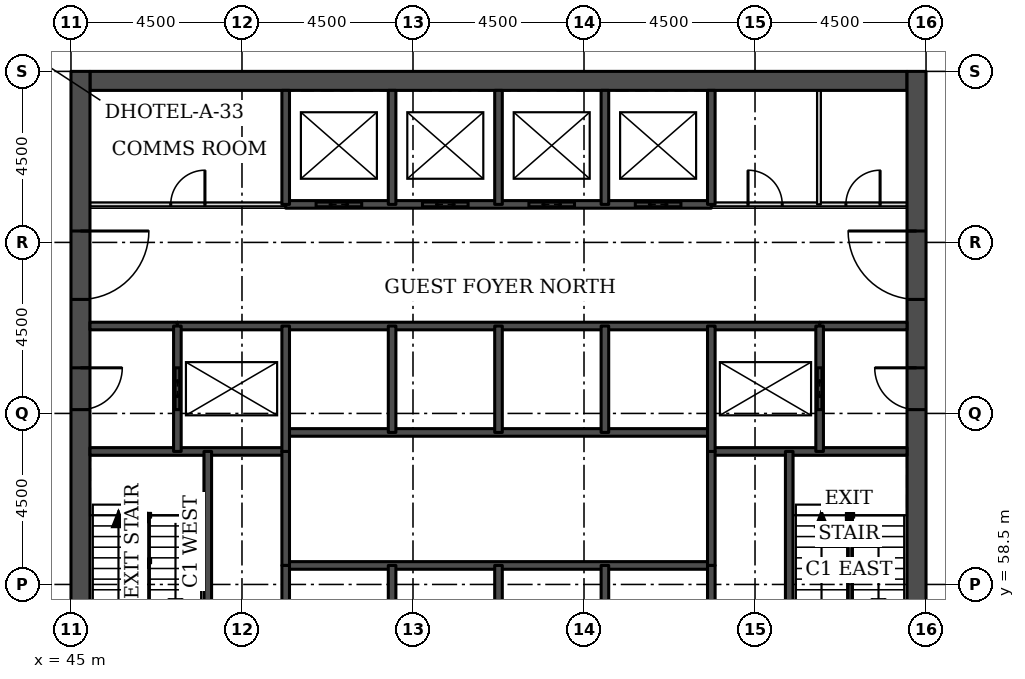
"""IFC4 building model, lengths in metres.
Left out: names, types, materials, properties, quantities, classifications, styles, units other than length and angle.
Written with IfcOpenShell. Run it as: python <this file> out.ifc"""

import sys

from ifc_helpers import new_model, si_unit, direction, frame, frame_2d, origin, place, context, subcontext, project, spatial, rectangle, extrude, element, fill, save


model = new_model("IFC4")
c1 = context("Model", 3, precision=1e-05, world=origin(), true_north=direction((0.0, 1.0)))
c2 = subcontext(c1, "Body", "Model", "MODEL_VIEW")
j1 = project(units=[si_unit("LENGTHUNIT", "METRE"), si_unit("PLANEANGLEUNIT", "RADIAN")], contexts=[c1])
p1 = place(None, origin())
s1 = spatial("IfcSite", under=j1, at=p1, CompositionType="ELEMENT")
p2 = place(p1, origin())
s2 = spatial("IfcBuilding", under=s1, at=p2, CompositionType="ELEMENT")
p3 = place(p2, frame((0.0, 0.0, 26.4)))
s3 = spatial("IfcBuildingStorey", under=s2, at=p3, CompositionType="ELEMENT", Elevation=26.4)
p4 = place(p3, frame((45.5, 71.75, 0.0), z_axis=(0.0, 0.0, 1.0), x_axis=(1.0, 0.0, 0.0)))
e1 = element("IfcWall", 1, at=p4, inside=s3, PredefinedType="SHEAR", context=c2, shape_type="SweptSolid", body=[
    extrude(rectangle(XDim=21.5, YDim=0.5, at=frame_2d((10.75, 0.0))), origin(), (0.0, 0.0, 1.0), 3.3),
])
p5 = place(p3, frame((45.25, 49.5, 0.0), z_axis=(0.0, 0.0, 1.0), x_axis=(0.0, 1.0, 0.0)))
e2 = element("IfcWall", 2, at=p5, inside=s3, PredefinedType="SHEAR", context=c2, shape_type="SweptSolid", body=[
    extrude(rectangle(XDim=22.5, YDim=0.5, at=frame_2d((11.25, 0.0))), origin(), (0.0, 0.0, 1.0), 3.3),
])
p6 = place(p5, frame((4.2, 0.0, 0.0)))
e3 = element("IfcOpeningElement", 3, at=p6, cuts=e2, PredefinedType="OPENING", context=c2, shape_type="SweptSolid", body=[
    extrude(rectangle(XDim=1.8, YDim=2.1, at=frame_2d((0.9, 1.05))), frame((0.0, 0.26, 0.0), z_axis=(0.0, -1.0, 0.0), x_axis=(1.0, 0.0, 0.0)), (0.0, 0.0, 1.0), 0.52),
])
p7 = place(p5, frame((6.9, 0.0, 0.0)))
e4 = element("IfcOpeningElement", 4, at=p7, cuts=e2, PredefinedType="OPENING", context=c2, shape_type="SweptSolid", body=[
    extrude(rectangle(XDim=1.1, YDim=2.1, at=frame_2d((0.55, 1.05))), frame((0.0, 0.26, 0.0), z_axis=(0.0, -1.0, 0.0), x_axis=(1.0, 0.0, 0.0)), (0.0, 0.0, 1.0), 0.52),
])
p8 = place(p5, frame((13.6, 0.0, 0.0)))
e5 = element("IfcOpeningElement", 5, at=p8, cuts=e2, PredefinedType="OPENING", context=c2, shape_type="SweptSolid", body=[
    extrude(rectangle(XDim=1.1, YDim=2.1, at=frame_2d((0.55, 1.05))), frame((0.0, 0.26, 0.0), z_axis=(0.0, -1.0, 0.0), x_axis=(1.0, 0.0, 0.0)), (0.0, 0.0, 1.0), 0.52),
])
p9 = place(p5, frame((16.5, 0.0, 0.0)))
e6 = element("IfcOpeningElement", 6, at=p9, cuts=e2, PredefinedType="OPENING", context=c2, shape_type="SweptSolid", body=[
    extrude(rectangle(XDim=1.8, YDim=2.1, at=frame_2d((0.9, 1.05))), frame((0.0, 0.26, 0.0), z_axis=(0.0, -1.0, 0.0), x_axis=(1.0, 0.0, 0.0)), (0.0, 0.0, 1.0), 0.52),
])
p10 = place(p3, frame((67.25, 49.5, 0.0), z_axis=(0.0, 0.0, 1.0), x_axis=(0.0, 1.0, 0.0)))
e7 = element("IfcWall", 7, at=p10, inside=s3, PredefinedType="SHEAR", context=c2, shape_type="SweptSolid", body=[
    extrude(rectangle(XDim=22.5, YDim=0.5, at=frame_2d((11.25, 0.0))), origin(), (0.0, 0.0, 1.0), 3.3),
])
p11 = place(p10, frame((4.2, 0.0, 0.0)))
e8 = element("IfcOpeningElement", 8, at=p11, cuts=e7, PredefinedType="OPENING", context=c2, shape_type="SweptSolid", body=[
    extrude(rectangle(XDim=1.8, YDim=2.1, at=frame_2d((0.9, 1.05))), frame((0.0, 0.26, 0.0), z_axis=(0.0, -1.0, 0.0), x_axis=(1.0, 0.0, 0.0)), (0.0, 0.0, 1.0), 0.52),
])
p12 = place(p10, frame((6.9, 0.0, 0.0)))
e9 = element("IfcOpeningElement", 9, at=p12, cuts=e7, PredefinedType="OPENING", context=c2, shape_type="SweptSolid", body=[
    extrude(rectangle(XDim=1.1, YDim=2.1, at=frame_2d((0.55, 1.05))), frame((0.0, 0.26, 0.0), z_axis=(0.0, -1.0, 0.0), x_axis=(1.0, 0.0, 0.0)), (0.0, 0.0, 1.0), 0.52),
])
p13 = place(p10, frame((13.6, 0.0, 0.0)))
e10 = element("IfcOpeningElement", 10, at=p13, cuts=e7, PredefinedType="OPENING", context=c2, shape_type="SweptSolid", body=[
    extrude(rectangle(XDim=1.1, YDim=2.1, at=frame_2d((0.55, 1.05))), frame((0.0, 0.26, 0.0), z_axis=(0.0, -1.0, 0.0), x_axis=(1.0, 0.0, 0.0)), (0.0, 0.0, 1.0), 0.52),
])
p14 = place(p10, frame((16.5, 0.0, 0.0)))
e11 = element("IfcOpeningElement", 11, at=p14, cuts=e7, PredefinedType="OPENING", context=c2, shape_type="SweptSolid", body=[
    extrude(rectangle(XDim=1.8, YDim=2.1, at=frame_2d((0.9, 1.05))), frame((0.0, 0.26, 0.0), z_axis=(0.0, -1.0, 0.0), x_axis=(1.0, 0.0, 0.0)), (0.0, 0.0, 1.0), 0.52),
])
p15 = place(p3, frame((50.65, 59.0, 0.0), z_axis=(0.0, 0.0, 1.0), x_axis=(1.0, 0.0, 0.0)))
e12 = element("IfcWall", 12, at=p15, inside=s3, PredefinedType="SOLIDWALL", context=c2, shape_type="SweptSolid", body=[
    extrude(rectangle(XDim=11.2, YDim=0.2, at=frame_2d((5.6, 0.0))), origin(), (0.0, 0.0, 1.0), 3.3),
])
for number, where, z_axis, x_axis in (
    (13, (45.5, 62.0, 0.0), (0.0, 0.0, 1.0), (1.0, 0.0, 0.0)),
    (14, (61.85, 62.0, 0.0), (0.0, 0.0, 1.0), (1.0, 0.0, 0.0)),
):
    element("IfcWall", number, at=place(p3, frame(where, z_axis=z_axis, x_axis=x_axis)), inside=s3, PredefinedType="SOLIDWALL", context=c2, shape_type="SweptSolid", body=[
        extrude(rectangle(XDim=5.15, YDim=0.2, at=frame_2d((2.575, 0.0))), origin(), (0.0, 0.0, 1.0), 3.08),
    ])
p16 = place(p3, frame((50.65, 62.5, 0.0), z_axis=(0.0, 0.0, 1.0), x_axis=(1.0, 0.0, 0.0)))
e15 = element("IfcWall", 15, at=p16, inside=s3, PredefinedType="SOLIDWALL", context=c2, shape_type="SweptSolid", body=[
    extrude(rectangle(XDim=11.2, YDim=0.2, at=frame_2d((5.6, 0.0))), origin(), (0.0, 0.0, 1.0), 3.3),
])
for number, where, z_axis, x_axis in (
    (16, (45.5, 65.3, 0.0), (0.0, 0.0, 1.0), (1.0, 0.0, 0.0)),
    (17, (64.7, 65.3, 0.0), (0.0, 0.0, 1.0), (1.0, 0.0, 0.0)),
):
    element("IfcWall", number, at=place(p3, frame(where, z_axis=z_axis, x_axis=x_axis)), inside=s3, PredefinedType="SOLIDWALL", context=c2, shape_type="SweptSolid", body=[
        extrude(rectangle(XDim=2.3, YDim=0.2, at=frame_2d((1.15, 0.0))), origin(), (0.0, 0.0, 1.0), 3.08),
    ])
p17 = place(p3, frame((47.8, 65.3, 0.0), z_axis=(0.0, 0.0, 1.0), x_axis=(1.0, 0.0, 0.0)))
e18 = element("IfcWall", 18, at=p17, inside=s3, PredefinedType="SOLIDWALL", context=c2, shape_type="SweptSolid", body=[
    extrude(rectangle(XDim=16.9, YDim=0.2, at=frame_2d((8.45, 0.0))), origin(), (0.0, 0.0, 1.0), 3.08),
])
p18 = place(p3, frame((45.5, 68.5, 0.0), z_axis=(0.0, 0.0, 1.0), x_axis=(1.0, 0.0, 0.0)))
e19 = element("IfcWall", 19, at=p18, inside=s3, PredefinedType="PARTITIONING", context=c2, shape_type="SweptSolid", body=[
    extrude(rectangle(XDim=5.15, YDim=0.1, at=frame_2d((2.575, 0.0))), origin(), (0.0, 0.0, 1.0), 3.08),
])
p19 = place(p18, frame((2.125, 0.0, 0.0)))
e20 = element("IfcOpeningElement", 20, at=p19, cuts=e19, PredefinedType="OPENING", context=c2, shape_type="SweptSolid", body=[
    extrude(rectangle(XDim=0.9, YDim=2.1, at=frame_2d((0.45, 1.05))), frame((0.0, 0.06, 0.0), z_axis=(0.0, -1.0, 0.0), x_axis=(1.0, 0.0, 0.0)), (0.0, 0.0, 1.0), 0.12),
])
p20 = place(p3, frame((61.85, 68.5, 0.0), z_axis=(0.0, 0.0, 1.0), x_axis=(1.0, 0.0, 0.0)))
e21 = element("IfcWall", 21, at=p20, inside=s3, PredefinedType="PARTITIONING", context=c2, shape_type="SweptSolid", body=[
    extrude(rectangle(XDim=5.15, YDim=0.1, at=frame_2d((2.575, 0.0))), origin(), (0.0, 0.0, 1.0), 3.08),
])
p21 = place(p20, frame((3.541, 0.0, 0.0)))
e22 = element("IfcOpeningElement", 22, at=p21, cuts=e21, PredefinedType="OPENING", context=c2, shape_type="SweptSolid", body=[
    extrude(rectangle(XDim=0.9, YDim=2.1, at=frame_2d((0.45, 1.05))), frame((0.0, 0.06, 0.0), z_axis=(0.0, -1.0, 0.0), x_axis=(1.0, 0.0, 0.0)), (0.0, 0.0, 1.0), 0.12),
])
p22 = place(p20, frame((0.966, 0.0, 0.0)))
e23 = element("IfcOpeningElement", 23, at=p22, cuts=e21, PredefinedType="OPENING", context=c2, shape_type="SweptSolid", body=[
    extrude(rectangle(XDim=0.9, YDim=2.1, at=frame_2d((0.45, 1.05))), frame((0.0, 0.06, 0.0), z_axis=(0.0, -1.0, 0.0), x_axis=(1.0, 0.0, 0.0)), (0.0, 0.0, 1.0), 0.12),
])
p23 = place(p3, frame((50.65, 68.5, 0.0), z_axis=(0.0, 0.0, 1.0), x_axis=(1.0, 0.0, 0.0)))
e24 = element("IfcWall", 24, at=p23, inside=s3, PredefinedType="SOLIDWALL", context=c2, shape_type="SweptSolid", body=[
    extrude(rectangle(XDim=11.2, YDim=0.2, at=frame_2d((5.6, 0.0))), origin(), (0.0, 0.0, 1.0), 3.08),
])
p24 = place(p23, frame((0.8, 0.0, 0.0)))
e25 = element("IfcOpeningElement", 25, at=p24, cuts=e24, PredefinedType="OPENING", context=c2, shape_type="SweptSolid", body=[
    extrude(rectangle(XDim=1.2, YDim=2.1, at=frame_2d((0.6, 1.05))), frame((0.0, 0.11, 0.0), z_axis=(0.0, -1.0, 0.0), x_axis=(1.0, 0.0, 0.0)), (0.0, 0.0, 1.0), 0.22),
])
p25 = place(p23, frame((3.6, 0.0, 0.0)))
e26 = element("IfcOpeningElement", 26, at=p25, cuts=e24, PredefinedType="OPENING", context=c2, shape_type="SweptSolid", body=[
    extrude(rectangle(XDim=1.2, YDim=2.1, at=frame_2d((0.6, 1.05))), frame((0.0, 0.11, 0.0), z_axis=(0.0, -1.0, 0.0), x_axis=(1.0, 0.0, 0.0)), (0.0, 0.0, 1.0), 0.22),
])
p26 = place(p23, frame((6.4, 0.0, 0.0)))
e27 = element("IfcOpeningElement", 27, at=p26, cuts=e24, PredefinedType="OPENING", context=c2, shape_type="SweptSolid", body=[
    extrude(rectangle(XDim=1.2, YDim=2.1, at=frame_2d((0.6, 1.05))), frame((0.0, 0.11, 0.0), z_axis=(0.0, -1.0, 0.0), x_axis=(1.0, 0.0, 0.0)), (0.0, 0.0, 1.0), 0.22),
])
p27 = place(p23, frame((9.2, 0.0, 0.0)))
e28 = element("IfcOpeningElement", 28, at=p27, cuts=e24, PredefinedType="OPENING", context=c2, shape_type="SweptSolid", body=[
    extrude(rectangle(XDim=1.2, YDim=2.1, at=frame_2d((0.6, 1.05))), frame((0.0, 0.11, 0.0), z_axis=(0.0, -1.0, 0.0), x_axis=(1.0, 0.0, 0.0)), (0.0, 0.0, 1.0), 0.22),
])
p28 = place(p3, frame((47.8, 62.0, 0.0), z_axis=(0.0, 0.0, 1.0), x_axis=(0.0, 1.0, 0.0)))
e29 = element("IfcWall", 29, at=p28, inside=s3, PredefinedType="SOLIDWALL", context=c2, shape_type="SweptSolid", body=[
    extrude(rectangle(XDim=3.3, YDim=0.2, at=frame_2d((1.65, 0.0))), origin(), (0.0, 0.0, 1.0), 3.08),
])
p29 = place(p28, frame((1.1, 0.0, 0.0)))
e30 = element("IfcOpeningElement", 30, at=p29, cuts=e29, PredefinedType="OPENING", context=c2, shape_type="SweptSolid", body=[
    extrude(rectangle(XDim=1.1, YDim=2.1, at=frame_2d((0.55, 1.05))), frame((0.0, 0.11, 0.0), z_axis=(0.0, -1.0, 0.0), x_axis=(1.0, 0.0, 0.0)), (0.0, 0.0, 1.0), 0.22),
])
p30 = place(p3, frame((48.6, 56.2, 0.0), z_axis=(0.0, 0.0, 1.0), x_axis=(0.0, 1.0, 0.0)))
e31 = element("IfcWall", 31, at=p30, inside=s3, PredefinedType="SOLIDWALL", context=c2, shape_type="SweptSolid", body=[
    extrude(rectangle(XDim=5.8, YDim=0.2, at=frame_2d((2.9, 0.0))), origin(), (0.0, 0.0, 1.0), 3.08),
])
p31 = place(p3, frame((50.65, 59.0, 0.0), z_axis=(0.0, 0.0, 1.0), x_axis=(0.0, 1.0, 0.0)))
e32 = element("IfcWall", 32, at=p31, inside=s3, PredefinedType="SOLIDWALL", context=c2, shape_type="SweptSolid", body=[
    extrude(rectangle(XDim=3.0, YDim=0.2, at=frame_2d((1.5, 0.0))), origin(), (0.0, 0.0, 1.0), 3.3),
])
p32 = place(p3, frame((50.65, 56.2, 0.0), z_axis=(0.0, 0.0, 1.0), x_axis=(0.0, 1.0, 0.0)))
e33 = element("IfcWall", 33, at=p32, inside=s3, PredefinedType="SOLIDWALL", context=c2, shape_type="SweptSolid", body=[
    extrude(rectangle(XDim=2.8, YDim=0.2, at=frame_2d((1.4, 0.0))), origin(), (0.0, 0.0, 1.0), 3.08),
])
p33 = place(p3, frame((50.65, 62.0, 0.0), z_axis=(0.0, 0.0, 1.0), x_axis=(0.0, 1.0, 0.0)))
e34 = element("IfcWall", 34, at=p33, inside=s3, PredefinedType="SOLIDWALL", context=c2, shape_type="SweptSolid", body=[
    extrude(rectangle(XDim=3.3, YDim=0.2, at=frame_2d((1.65, 0.0))), origin(), (0.0, 0.0, 1.0), 3.08),
])
p34 = place(p3, frame((50.65, 68.5, 0.0), z_axis=(0.0, 0.0, 1.0), x_axis=(0.0, 1.0, 0.0)))
e35 = element("IfcWall", 35, at=p34, inside=s3, PredefinedType="SOLIDWALL", context=c2, shape_type="SweptSolid", body=[
    extrude(rectangle(XDim=3.0, YDim=0.2, at=frame_2d((1.5, 0.0))), origin(), (0.0, 0.0, 1.0), 3.08),
])
for number, where, z_axis, x_axis in (
    (36, (53.45, 56.2, 0.0), (0.0, 0.0, 1.0), (0.0, 1.0, 0.0)),
    (37, (53.45, 62.5, 0.0), (0.0, 0.0, 1.0), (0.0, 1.0, 0.0)),
):
    element("IfcWall", number, at=place(p3, frame(where, z_axis=z_axis, x_axis=x_axis)), inside=s3, PredefinedType="SOLIDWALL", context=c2, shape_type="SweptSolid", body=[
        extrude(rectangle(XDim=2.8, YDim=0.2, at=frame_2d((1.4, 0.0))), origin(), (0.0, 0.0, 1.0), 3.08),
    ])
p35 = place(p3, frame((53.45, 68.5, 0.0), z_axis=(0.0, 0.0, 1.0), x_axis=(0.0, 1.0, 0.0)))
e38 = element("IfcWall", 38, at=p35, inside=s3, PredefinedType="SOLIDWALL", context=c2, shape_type="SweptSolid", body=[
    extrude(rectangle(XDim=3.0, YDim=0.2, at=frame_2d((1.5, 0.0))), origin(), (0.0, 0.0, 1.0), 3.08),
])
for number, where, z_axis, x_axis in (
    (39, (56.25, 56.2, 0.0), (0.0, 0.0, 1.0), (0.0, 1.0, 0.0)),
    (40, (56.25, 62.5, 0.0), (0.0, 0.0, 1.0), (0.0, 1.0, 0.0)),
):
    element("IfcWall", number, at=place(p3, frame(where, z_axis=z_axis, x_axis=x_axis)), inside=s3, PredefinedType="SOLIDWALL", context=c2, shape_type="SweptSolid", body=[
        extrude(rectangle(XDim=2.8, YDim=0.2, at=frame_2d((1.4, 0.0))), origin(), (0.0, 0.0, 1.0), 3.08),
    ])
p36 = place(p3, frame((56.25, 68.5, 0.0), z_axis=(0.0, 0.0, 1.0), x_axis=(0.0, 1.0, 0.0)))
e41 = element("IfcWall", 41, at=p36, inside=s3, PredefinedType="SOLIDWALL", context=c2, shape_type="SweptSolid", body=[
    extrude(rectangle(XDim=3.0, YDim=0.2, at=frame_2d((1.5, 0.0))), origin(), (0.0, 0.0, 1.0), 3.08),
])
for number, where, z_axis, x_axis in (
    (42, (59.05, 56.2, 0.0), (0.0, 0.0, 1.0), (0.0, 1.0, 0.0)),
    (43, (59.05, 62.5, 0.0), (0.0, 0.0, 1.0), (0.0, 1.0, 0.0)),
):
    element("IfcWall", number, at=place(p3, frame(where, z_axis=z_axis, x_axis=x_axis)), inside=s3, PredefinedType="SOLIDWALL", context=c2, shape_type="SweptSolid", body=[
        extrude(rectangle(XDim=2.8, YDim=0.2, at=frame_2d((1.4, 0.0))), origin(), (0.0, 0.0, 1.0), 3.08),
    ])
p37 = place(p3, frame((59.05, 68.5, 0.0), z_axis=(0.0, 0.0, 1.0), x_axis=(0.0, 1.0, 0.0)))
e44 = element("IfcWall", 44, at=p37, inside=s3, PredefinedType="SOLIDWALL", context=c2, shape_type="SweptSolid", body=[
    extrude(rectangle(XDim=3.0, YDim=0.2, at=frame_2d((1.5, 0.0))), origin(), (0.0, 0.0, 1.0), 3.08),
])
p38 = place(p3, frame((61.85, 59.0, 0.0), z_axis=(0.0, 0.0, 1.0), x_axis=(0.0, 1.0, 0.0)))
e45 = element("IfcWall", 45, at=p38, inside=s3, PredefinedType="SOLIDWALL", context=c2, shape_type="SweptSolid", body=[
    extrude(rectangle(XDim=3.0, YDim=0.2, at=frame_2d((1.5, 0.0))), origin(), (0.0, 0.0, 1.0), 3.3),
])
p39 = place(p3, frame((61.85, 56.2, 0.0), z_axis=(0.0, 0.0, 1.0), x_axis=(0.0, 1.0, 0.0)))
e46 = element("IfcWall", 46, at=p39, inside=s3, PredefinedType="SOLIDWALL", context=c2, shape_type="SweptSolid", body=[
    extrude(rectangle(XDim=2.8, YDim=0.2, at=frame_2d((1.4, 0.0))), origin(), (0.0, 0.0, 1.0), 3.08),
])
p40 = place(p3, frame((61.85, 62.0, 0.0), z_axis=(0.0, 0.0, 1.0), x_axis=(0.0, 1.0, 0.0)))
e47 = element("IfcWall", 47, at=p40, inside=s3, PredefinedType="SOLIDWALL", context=c2, shape_type="SweptSolid", body=[
    extrude(rectangle(XDim=3.3, YDim=0.2, at=frame_2d((1.65, 0.0))), origin(), (0.0, 0.0, 1.0), 3.08),
])
p41 = place(p3, frame((61.85, 68.5, 0.0), z_axis=(0.0, 0.0, 1.0), x_axis=(0.0, 1.0, 0.0)))
e48 = element("IfcWall", 48, at=p41, inside=s3, PredefinedType="SOLIDWALL", context=c2, shape_type="SweptSolid", body=[
    extrude(rectangle(XDim=3.0, YDim=0.2, at=frame_2d((1.5, 0.0))), origin(), (0.0, 0.0, 1.0), 3.08),
])
p42 = place(p3, frame((63.9, 56.2, 0.0), z_axis=(0.0, 0.0, 1.0), x_axis=(0.0, 1.0, 0.0)))
e49 = element("IfcWall", 49, at=p42, inside=s3, PredefinedType="SOLIDWALL", context=c2, shape_type="SweptSolid", body=[
    extrude(rectangle(XDim=5.8, YDim=0.2, at=frame_2d((2.9, 0.0))), origin(), (0.0, 0.0, 1.0), 3.08),
])
p43 = place(p3, frame((64.683, 68.5, 0.0), z_axis=(0.0, 0.0, 1.0), x_axis=(0.0, 1.0, 0.0)))
e50 = element("IfcWall", 50, at=p43, inside=s3, PredefinedType="PARTITIONING", context=c2, shape_type="SweptSolid", body=[
    extrude(rectangle(XDim=3.0, YDim=0.1, at=frame_2d((1.5, 0.0))), origin(), (0.0, 0.0, 1.0), 3.08),
])
p44 = place(p3, frame((64.7, 62.0, 0.0), z_axis=(0.0, 0.0, 1.0), x_axis=(0.0, 1.0, 0.0)))
e51 = element("IfcWall", 51, at=p44, inside=s3, PredefinedType="SOLIDWALL", context=c2, shape_type="SweptSolid", body=[
    extrude(rectangle(XDim=3.3, YDim=0.2, at=frame_2d((1.65, 0.0))), origin(), (0.0, 0.0, 1.0), 3.08),
])
p45 = place(p44, frame((1.1, 0.0, 0.0)))
e52 = element("IfcOpeningElement", 52, at=p45, cuts=e51, PredefinedType="OPENING", context=c2, shape_type="SweptSolid", body=[
    extrude(rectangle(XDim=1.1, YDim=2.1, at=frame_2d((0.55, 1.05))), frame((0.0, 0.11, 0.0), z_axis=(0.0, -1.0, 0.0), x_axis=(1.0, 0.0, 0.0)), (0.0, 0.0, 1.0), 0.22),
])
p46 = place(p24, origin())
e53 = element("IfcDoor", 53, at=p46, inside=s3, OperationType="DOUBLE_DOOR_SLIDING", PredefinedType="DOOR", context=c2, shape_type="SweptSolid", body=[
    extrude(rectangle(XDim=1.2, YDim=2.1, at=frame_2d((0.6, 1.05))), frame((0.0, 0.025, 0.0), z_axis=(0.0, -1.0, 0.0), x_axis=(1.0, 0.0, 0.0)), (0.0, 0.0, 1.0), 0.05),
])
fill(e25, e53)
p47 = place(p25, origin())
e54 = element("IfcDoor", 54, at=p47, inside=s3, OperationType="DOUBLE_DOOR_SLIDING", PredefinedType="DOOR", context=c2, shape_type="SweptSolid", body=[
    extrude(rectangle(XDim=1.2, YDim=2.1, at=frame_2d((0.6, 1.05))), frame((0.0, 0.025, 0.0), z_axis=(0.0, -1.0, 0.0), x_axis=(1.0, 0.0, 0.0)), (0.0, 0.0, 1.0), 0.05),
])
fill(e26, e54)
p48 = place(p26, origin())
e55 = element("IfcDoor", 55, at=p48, inside=s3, OperationType="DOUBLE_DOOR_SLIDING", PredefinedType="DOOR", context=c2, shape_type="SweptSolid", body=[
    extrude(rectangle(XDim=1.2, YDim=2.1, at=frame_2d((0.6, 1.05))), frame((0.0, 0.025, 0.0), z_axis=(0.0, -1.0, 0.0), x_axis=(1.0, 0.0, 0.0)), (0.0, 0.0, 1.0), 0.05),
])
fill(e27, e55)
p49 = place(p27, origin())
e56 = element("IfcDoor", 56, at=p49, inside=s3, OperationType="DOUBLE_DOOR_SLIDING", PredefinedType="DOOR", context=c2, shape_type="SweptSolid", body=[
    extrude(rectangle(XDim=1.2, YDim=2.1, at=frame_2d((0.6, 1.05))), frame((0.0, 0.025, 0.0), z_axis=(0.0, -1.0, 0.0), x_axis=(1.0, 0.0, 0.0)), (0.0, 0.0, 1.0), 0.05),
])
fill(e28, e56)
p50 = place(p29, origin())
e57 = element("IfcDoor", 57, at=p50, inside=s3, OperationType="DOUBLE_DOOR_SLIDING", PredefinedType="DOOR", context=c2, shape_type="SweptSolid", body=[
    extrude(rectangle(XDim=1.1, YDim=2.1, at=frame_2d((0.55, 1.05))), frame((0.0, 0.025, 0.0), z_axis=(0.0, -1.0, 0.0), x_axis=(1.0, 0.0, 0.0)), (0.0, 0.0, 1.0), 0.05),
])
fill(e30, e57)
p51 = place(p45, origin())
e58 = element("IfcDoor", 58, at=p51, inside=s3, OperationType="DOUBLE_DOOR_SLIDING", PredefinedType="DOOR", context=c2, shape_type="SweptSolid", body=[
    extrude(rectangle(XDim=1.1, YDim=2.1, at=frame_2d((0.55, 1.05))), frame((0.0, 0.025, 0.0), z_axis=(0.0, -1.0, 0.0), x_axis=(1.0, 0.0, 0.0)), (0.0, 0.0, 1.0), 0.05),
])
fill(e52, e58)
p52 = place(p8, frame((1.1, 0.0, 0.0), z_axis=(0.0, 0.0, 1.0), x_axis=(-1.0, 0.0, 0.0)))
e59 = element("IfcDoor", 59, at=p52, inside=s3, OperationType="SINGLE_SWING_LEFT", PredefinedType="DOOR", context=c2, shape_type="SweptSolid", body=[
    extrude(rectangle(XDim=1.1, YDim=2.1, at=frame_2d((0.55, 1.05))), frame((0.0, 0.025, 0.0), z_axis=(0.0, -1.0, 0.0), x_axis=(1.0, 0.0, 0.0)), (0.0, 0.0, 1.0), 0.05),
])
fill(e5, e59)
p53 = place(p9, frame((1.8, 0.0, 0.0), z_axis=(0.0, 0.0, 1.0), x_axis=(-1.0, 0.0, 0.0)))
e60 = element("IfcDoor", 60, at=p53, inside=s3, OperationType="SINGLE_SWING_LEFT", PredefinedType="DOOR", context=c2, shape_type="SweptSolid", body=[
    extrude(rectangle(XDim=1.8, YDim=2.1, at=frame_2d((0.9, 1.05))), frame((0.0, 0.025, 0.0), z_axis=(0.0, -1.0, 0.0), x_axis=(1.0, 0.0, 0.0)), (0.0, 0.0, 1.0), 0.05),
])
fill(e6, e60)
p54 = place(p13, origin())
e61 = element("IfcDoor", 61, at=p54, inside=s3, OperationType="SINGLE_SWING_RIGHT", PredefinedType="DOOR", context=c2, shape_type="SweptSolid", body=[
    extrude(rectangle(XDim=1.1, YDim=2.1, at=frame_2d((0.55, 1.05))), frame((0.0, 0.025, 0.0), z_axis=(0.0, -1.0, 0.0), x_axis=(1.0, 0.0, 0.0)), (0.0, 0.0, 1.0), 0.05),
])
fill(e10, e61)
p55 = place(p14, origin())
e62 = element("IfcDoor", 62, at=p55, inside=s3, OperationType="SINGLE_SWING_RIGHT", PredefinedType="DOOR", context=c2, shape_type="SweptSolid", body=[
    extrude(rectangle(XDim=1.8, YDim=2.1, at=frame_2d((0.9, 1.05))), frame((0.0, 0.025, 0.0), z_axis=(0.0, -1.0, 0.0), x_axis=(1.0, 0.0, 0.0)), (0.0, 0.0, 1.0), 0.05),
])
fill(e11, e62)
p56 = place(p21, origin())
e63 = element("IfcDoor", 63, at=p56, inside=s3, OperationType="SINGLE_SWING_RIGHT", PredefinedType="DOOR", context=c2, shape_type="SweptSolid", body=[
    extrude(rectangle(XDim=0.9, YDim=2.1, at=frame_2d((0.45, 1.05))), frame((0.0, 0.025, 0.0), z_axis=(0.0, -1.0, 0.0), x_axis=(1.0, 0.0, 0.0)), (0.0, 0.0, 1.0), 0.05),
])
fill(e22, e63)
p57 = place(p22, origin())
e64 = element("IfcDoor", 64, at=p57, inside=s3, OperationType="SINGLE_SWING_LEFT", PredefinedType="DOOR", context=c2, shape_type="SweptSolid", body=[
    extrude(rectangle(XDim=0.9, YDim=2.1, at=frame_2d((0.45, 1.05))), frame((0.0, 0.025, 0.0), z_axis=(0.0, -1.0, 0.0), x_axis=(1.0, 0.0, 0.0)), (0.0, 0.0, 1.0), 0.05),
])
fill(e23, e64)
p58 = place(p19, origin())
e65 = element("IfcDoor", 65, at=p58, inside=s3, OperationType="SINGLE_SWING_RIGHT", PredefinedType="DOOR", context=c2, shape_type="SweptSolid", body=[
    extrude(rectangle(XDim=0.9, YDim=2.1, at=frame_2d((0.45, 1.05))), frame((0.0, 0.025, 0.0), z_axis=(0.0, -1.0, 0.0), x_axis=(1.0, 0.0, 0.0)), (0.0, 0.0, 1.0), 0.05),
])
fill(e20, e65)
save(model, sys.argv[1])
